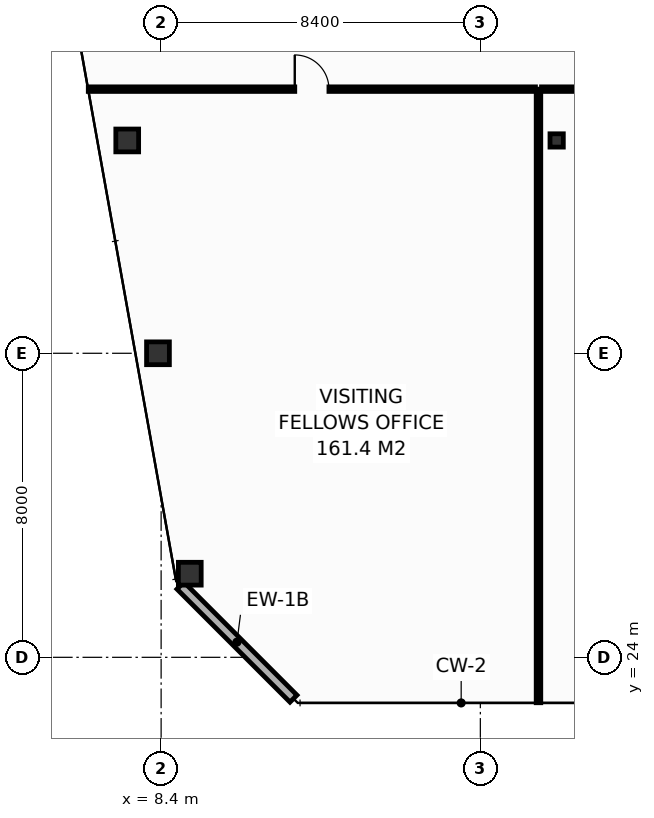
"""IFC4 building model, lengths in metres.
Left out: names, types, materials, properties, quantities, classifications, styles, units other than length and angle.
Written with IfcOpenShell. Run it as: python <this file> out.ifc"""

import sys

from ifc_helpers import new_model, si_unit, direction, frame, frame_2d, origin, origin_2d, place, context, subcontext, project, spatial, rectangle, hollow_rectangle, extrude, element, fill, save


model = new_model("IFC4")
c1 = context("Model", 3, precision=1e-05, world=origin(), true_north=direction((0.0, 1.0)))
c2 = subcontext(c1, "Body", "Model", "MODEL_VIEW")
j1 = project(units=[si_unit("LENGTHUNIT", "METRE"), si_unit("PLANEANGLEUNIT", "RADIAN")], contexts=[c1])
p1 = place(None, origin())
s1 = spatial("IfcSite", under=j1, at=p1, CompositionType="ELEMENT")
p2 = place(p1, origin())
s2 = spatial("IfcBuilding", under=s1, at=p2, CompositionType="ELEMENT")
p3 = place(p2, frame((0.0, 0.0, 268.6)))
s3 = spatial("IfcBuildingStorey", under=s2, at=p3, CompositionType="ELEMENT", Elevation=268.6)
for number, where, z_axis, x_axis in (
    (1, (9.154, 26.2, 0.0), (0.0, 0.0, 1.0), (1.0, 0.0, 0.0)),
    (2, (8.317, 32.0, 0.0), (0.0, 0.0, 1.0), (1.0, 0.0, 0.0)),
    (3, (7.508, 37.6, 0.0), (0.0, 0.0, 1.0), (1.0, 0.0, 0.0)),
):
    element("IfcColumn", number, at=place(p3, frame(where, z_axis=z_axis, x_axis=x_axis)), inside=s3, PredefinedType="COLUMN", context=c2, shape_type="SweptSolid", body=[
        extrude(hollow_rectangle(XDim=0.6, YDim=0.6, WallThickness=0.028, at=origin_2d()), origin(), (0.0, 0.0, 1.0), 3.8),
    ])
p4 = place(p3, frame((18.808, 37.6, 0.0), z_axis=(0.0, 0.0, 1.0), x_axis=(1.0, 0.0, 0.0)))
e4 = element("IfcColumn", 4, at=p4, inside=s3, PredefinedType="COLUMN", context=c2, shape_type="SweptSolid", body=[
    extrude(hollow_rectangle(XDim=0.35, YDim=0.35, WallThickness=0.016, at=origin_2d()), origin(), (0.0, 0.0, 1.0), 3.8),
])
p5 = place(p3, frame((8.909, 25.887, 0.0), z_axis=(0.0, 0.0, 1.0), x_axis=(0.707106781187, -0.707106781187, 0.0)))
e5 = element("IfcWall", 5, at=p5, inside=s3, PredefinedType="STANDARD", context=c2, shape_type="SweptSolid", body=[
    extrude(rectangle(XDim=4.206, YDim=0.26, at=frame_2d((2.103, 0.0))), origin(), (0.0, 0.0, 1.0), 3.55),
])
p6 = place(p3, frame((18.33, 22.805, 0.0), z_axis=(0.0, 0.0, 1.0), x_axis=(0.0, 1.0, 0.0)))
e6 = element("IfcWall", 6, at=p6, inside=s3, PredefinedType="PARTITIONING", context=c2, shape_type="SweptSolid", body=[
    extrude(rectangle(XDim=16.145, YDim=0.12, at=frame_2d((8.073, 0.0))), origin(), (0.0, 0.0, 1.0), 2.947),
])
p7 = place(p3, frame((6.483, 38.95, 0.0), z_axis=(0.0, 0.0, 1.0), x_axis=(1.0, 0.0, 0.0)))
e7 = element("IfcWall", 7, at=p7, inside=s3, PredefinedType="PARTITIONING", context=c2, shape_type="SweptSolid", body=[
    extrude(rectangle(XDim=11.767, YDim=0.12, at=frame_2d((5.883, 0.0))), origin(), (0.0, 0.0, 1.0), 3.085),
])
p8 = place(p7, frame((5.433, 0.0, 0.0)))
e8 = element("IfcOpeningElement", 8, at=p8, cuts=e7, PredefinedType="OPENING", context=c2, shape_type="SweptSolid", body=[
    extrude(rectangle(XDim=0.9, YDim=2.1, at=frame_2d((0.45, 1.05))), frame((0.0, 0.07, 0.0), z_axis=(0.0, -1.0, 0.0), x_axis=(1.0, 0.0, 0.0)), (0.0, 0.0, 1.0), 0.14),
])
p9 = place(p3, frame((18.41, 38.95, 0.0), z_axis=(0.0, 0.0, 1.0), x_axis=(1.0, 0.0, 0.0)))
e9 = element("IfcWall", 9, at=p9, inside=s3, PredefinedType="PARTITIONING", context=c2, shape_type="SweptSolid", body=[
    extrude(rectangle(XDim=9.173, YDim=0.12, at=frame_2d((4.586, 0.0))), origin(), (0.0, 0.0, 1.0), 2.947),
])
p10 = place(p9, frame((4.136, 0.0, 0.0)))
e10 = element("IfcOpeningElement", 10, at=p10, cuts=e9, PredefinedType="OPENING", context=c2, shape_type="SweptSolid", body=[
    extrude(rectangle(XDim=0.9, YDim=2.1, at=frame_2d((0.45, 1.05))), frame((0.0, 0.07, 0.0), z_axis=(0.0, -1.0, 0.0), x_axis=(1.0, 0.0, 0.0)), (0.0, 0.0, 1.0), 0.14),
])
p11 = place(p8, origin())
e11 = element("IfcDoor", 11, at=p11, inside=s3, OperationType="SINGLE_SWING_LEFT", PredefinedType="DOOR", context=c2, shape_type="SweptSolid", body=[
    extrude(rectangle(XDim=0.9, YDim=2.1, at=frame_2d((0.45, 1.05))), frame((0.0, 0.025, 0.0), z_axis=(0.0, -1.0, 0.0), x_axis=(1.0, 0.0, 0.0)), (0.0, 0.0, 1.0), 0.05),
])
fill(e8, e11)
save(model, sys.argv[1])
